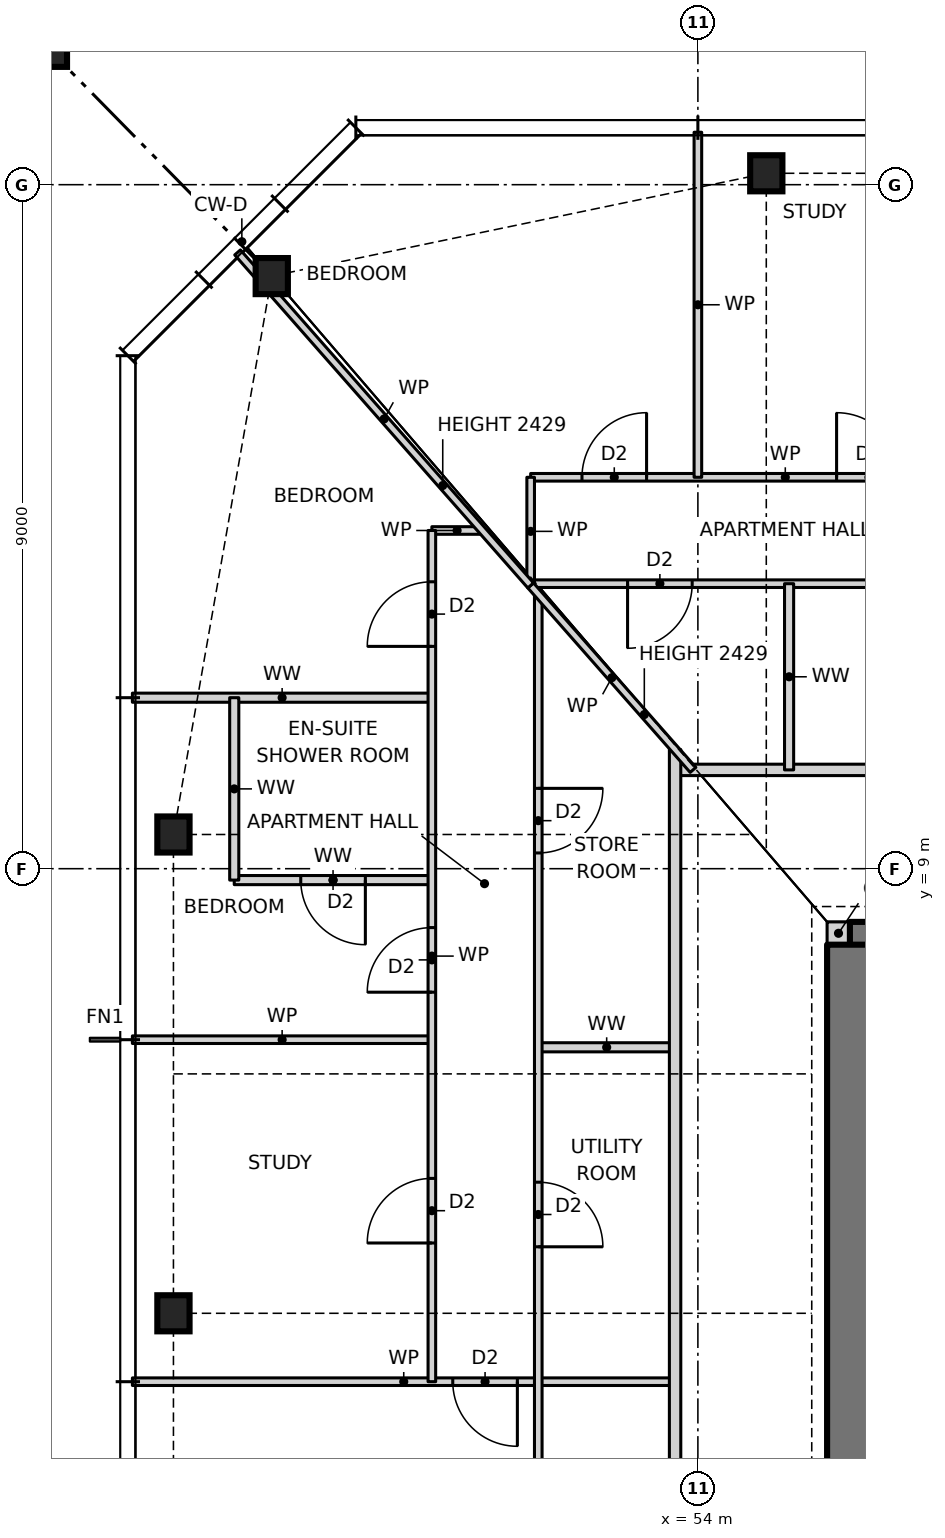
"""IFC4 building model, lengths in metres.
Left out: names, types, materials, properties, quantities, classifications, styles, units other than length and angle.
Written with IfcOpenShell. Run it as: python <this file> out.ifc"""

import sys

from ifc_helpers import new_model, si_unit, direction, frame, frame_2d, origin, origin_2d, place, context, subcontext, project, spatial, rectangle, hollow_rectangle, i_section, extrude, element, fill, save


model = new_model("IFC4")
c1 = context("Model", 3, precision=1e-05, world=origin(), true_north=direction((0.0, 1.0)))
c2 = subcontext(c1, "Body", "Model", "MODEL_VIEW")
j1 = project(units=[si_unit("LENGTHUNIT", "METRE"), si_unit("PLANEANGLEUNIT", "RADIAN")], contexts=[c1])
p1 = place(None, origin())
s1 = spatial("IfcSite", under=j1, at=p1, CompositionType="ELEMENT")
p2 = place(p1, origin())
s2 = spatial("IfcBuilding", under=s1, at=p2, CompositionType="ELEMENT")
p3 = place(p2, frame((0.0, 0.0, 15.0)))
s3 = spatial("IfcBuildingStorey", under=s2, at=p3, CompositionType="ELEMENT", Elevation=15.0)
for number, where, z_axis, x_axis in (
    (1, (54.9, 18.15, 0.0), (0.0, 0.0, 1.0), (1.0, 0.0, 0.0)),
    (2, (48.394, 16.797, 0.0), (0.0, 0.0, 1.0), (1.0, 0.0, 0.0)),
    (3, (47.1, 9.45, 0.0), (0.0, 0.0, 1.0), (1.0, 0.0, 0.0)),
    (4, (47.1, 3.15, 0.0), (0.0, 0.0, 1.0), (1.0, 0.0, 0.0)),
):
    element("IfcColumn", number, at=place(p3, frame(where, z_axis=z_axis, x_axis=x_axis)), inside=s3, PredefinedType="COLUMN", context=c2, shape_type="SweptSolid", body=[
        extrude(i_section(OverallWidth=0.424, OverallDepth=0.475, WebThickness=0.048, FlangeThickness=0.077, at=origin_2d()), origin(), (0.0, 0.0, 1.0), 3.5),
    ])
p4 = place(p3, frame((45.1, 20.15, 0.0), z_axis=(0.0, 0.0, 1.0), x_axis=(1.0, 0.0, 0.0)))
e5 = element("IfcColumn", 5, at=p4, inside=s3, PredefinedType="COLUMN", context=c2, shape_type="SweptSolid", body=[
    extrude(hollow_rectangle(XDim=1.2, YDim=1.2, WallThickness=0.07, at=origin_2d()), origin(), (0.0, 0.0, 1.0), 3.5),
])
p5 = place(p3, frame((55.7, 8.15, 0.0), z_axis=(0.0, 0.0, 1.0), x_axis=(1.0, 0.0, 0.0)))
e6 = element("IfcWall", 6, at=p5, inside=s3, PredefinedType="SOLIDWALL", context=c2, shape_type="SweptSolid", body=[
    extrude(rectangle(XDim=0.3, YDim=0.3, at=frame_2d((0.15, 0.0))), origin(), (0.0, 0.0, 1.0), 3.5),
])
p6 = place(p3, frame((70.0, 8.0, 0.0), z_axis=(0.0, 0.0, 1.0), x_axis=(-1.0, 0.0, 0.0)))
e7 = element("IfcWall", 7, at=p6, inside=s3, PredefinedType="SHEAR", context=c2, shape_type="SweptSolid", body=[
    extrude(rectangle(XDim=14.0, YDim=0.6, at=frame_2d((7.0, 0.0))), origin(), (0.0, 0.0, 1.0), 3.5),
])
p7 = place(p6, frame((8.2, 0.0, 0.0)))
e8 = element("IfcOpeningElement", 8, at=p7, cuts=e7, PredefinedType="OPENING", context=c2, shape_type="SweptSolid", body=[
    extrude(rectangle(XDim=0.9, YDim=2.1, at=frame_2d((0.45, 1.05))), frame((0.0, 0.31, 0.0), z_axis=(0.0, -1.0, 0.0), x_axis=(1.0, 0.0, 0.0)), (0.0, 0.0, 1.0), 0.62),
])
p8 = place(p6, frame((3.2, 0.0, 0.0)))
e9 = element("IfcOpeningElement", 9, at=p8, cuts=e7, PredefinedType="OPENING", context=c2, shape_type="SweptSolid", body=[
    extrude(rectangle(XDim=0.9, YDim=2.1, at=frame_2d((0.45, 1.05))), frame((0.0, 0.31, 0.0), z_axis=(0.0, -1.0, 0.0), x_axis=(1.0, 0.0, 0.0)), (0.0, 0.0, 1.0), 0.62),
])
p9 = place(p3, frame((56.0, 8.0, 0.0), z_axis=(0.0, 0.0, 1.0), x_axis=(0.0, -1.0, 0.0)))
e10 = element("IfcWall", 10, at=p9, inside=s3, PredefinedType="SHEAR", context=c2, shape_type="SweptSolid", body=[
    extrude(rectangle(XDim=16.0, YDim=0.6, at=frame_2d((8.0, 0.0))), origin(), (0.0, 0.0, 1.0), 3.5),
])
p10 = place(p9, frame((7.5, 0.0, 0.0)))
e11 = element("IfcOpeningElement", 11, at=p10, cuts=e10, PredefinedType="OPENING", context=c2, shape_type="SweptSolid", body=[
    extrude(rectangle(XDim=1.0, YDim=2.1, at=frame_2d((0.5, 1.05))), frame((0.0, 0.31, 0.0), z_axis=(0.0, -1.0, 0.0), x_axis=(1.0, 0.0, 0.0)), (0.0, 0.0, 1.0), 0.62),
])
p11 = place(p3, frame((46.56, 2.25, 0.0), z_axis=(0.0, 0.0, 1.0), x_axis=(1.0, 0.0, 0.0)))
e12 = element("IfcWall", 12, at=p11, inside=s3, PredefinedType="PARTITIONING", context=c2, shape_type="SweptSolid", body=[
    extrude(rectangle(XDim=7.14, YDim=0.1, at=frame_2d((3.57, 0.0))), origin(), (0.0, 0.0, 1.0), 3.27),
])
p12 = place(p11, frame((4.215, 0.0, 0.0)))
e13 = element("IfcOpeningElement", 13, at=p12, cuts=e12, PredefinedType="OPENING", context=c2, shape_type="SweptSolid", body=[
    extrude(rectangle(XDim=0.85, YDim=2.1, at=frame_2d((0.425, 1.05))), frame((0.0, 0.06, 0.0), z_axis=(0.0, -1.0, 0.0), x_axis=(1.0, 0.0, 0.0)), (0.0, 0.0, 1.0), 0.12),
])
p13 = place(p3, frame((51.9, 6.65, 0.0), z_axis=(0.0, 0.0, 1.0), x_axis=(1.0, 0.0, 0.0)))
e14 = element("IfcWall", 14, at=p13, inside=s3, PredefinedType="PARTITIONING", context=c2, shape_type="SweptSolid", body=[
    extrude(rectangle(XDim=1.8, YDim=0.12, at=frame_2d((0.9, 0.0))), origin(), (0.0, 0.0, 1.0), 3.27),
])
p14 = place(p3, frame((46.56, 6.75, 0.0), z_axis=(0.0, 0.0, 1.0), x_axis=(1.0, 0.0, 0.0)))
e15 = element("IfcWall", 15, at=p14, inside=s3, PredefinedType="PARTITIONING", context=c2, shape_type="SweptSolid", body=[
    extrude(rectangle(XDim=3.94, YDim=0.1, at=frame_2d((1.97, 0.0))), origin(), (0.0, 0.0, 1.0), 3.27),
])
p15 = place(p3, frame((47.9, 8.85, 0.0), z_axis=(0.0, 0.0, 1.0), x_axis=(1.0, 0.0, 0.0)))
e16 = element("IfcWall", 16, at=p15, inside=s3, PredefinedType="PARTITIONING", context=c2, shape_type="SweptSolid", body=[
    extrude(rectangle(XDim=2.6, YDim=0.12, at=frame_2d((1.3, 0.0))), origin(), (0.0, 0.0, 1.0), 3.27),
])
p16 = place(p15, frame((0.875, 0.0, 0.0)))
e17 = element("IfcOpeningElement", 17, at=p16, cuts=e16, PredefinedType="OPENING", context=c2, shape_type="SweptSolid", body=[
    extrude(rectangle(XDim=0.85, YDim=2.1, at=frame_2d((0.425, 1.05))), frame((0.0, 0.07, 0.0), z_axis=(0.0, -1.0, 0.0), x_axis=(1.0, 0.0, 0.0)), (0.0, 0.0, 1.0), 0.14),
])
p17 = place(p3, frame((53.7, 10.3, 0.0), z_axis=(0.0, 0.0, 1.0), x_axis=(1.0, 0.0, 0.0)))
e18 = element("IfcWall", 18, at=p17, inside=s3, PredefinedType="PARTITIONING", context=c2, shape_type="SweptSolid", body=[
    extrude(rectangle(XDim=18.6, YDim=0.15, at=frame_2d((9.3, 0.0))), origin(), (0.0, 0.0, 1.0), 3.27),
])
p18 = place(p17, frame((8.3, 0.0, 0.0)))
e19 = element("IfcOpeningElement", 19, at=p18, cuts=e18, PredefinedType="OPENING", context=c2, shape_type="SweptSolid", body=[
    extrude(rectangle(XDim=1.0, YDim=2.1, at=frame_2d((0.5, 1.05))), frame((0.0, 0.085, 0.0), z_axis=(0.0, -1.0, 0.0), x_axis=(1.0, 0.0, 0.0)), (0.0, 0.0, 1.0), 0.17),
])
p19 = place(p3, frame((46.56, 11.25, 0.0), z_axis=(0.0, 0.0, 1.0), x_axis=(1.0, 0.0, 0.0)))
e20 = element("IfcWall", 20, at=p19, inside=s3, PredefinedType="PARTITIONING", context=c2, shape_type="SweptSolid", body=[
    extrude(rectangle(XDim=3.94, YDim=0.12, at=frame_2d((1.97, 0.0))), origin(), (0.0, 0.0, 1.0), 3.27),
])
p20 = place(p3, frame((51.8, 12.75, 0.0), z_axis=(0.0, 0.0, 1.0), x_axis=(1.0, 0.0, 0.0)))
e21 = element("IfcWall", 21, at=p20, inside=s3, PredefinedType="PARTITIONING", context=c2, shape_type="SweptSolid", body=[
    extrude(rectangle(XDim=22.4, YDim=0.1, at=frame_2d((11.2, 0.0))), origin(), (0.0, 0.0, 1.0), 3.27),
])
p21 = place(p20, frame((13.475, 0.0, 0.0)))
e22 = element("IfcOpeningElement", 22, at=p21, cuts=e21, PredefinedType="OPENING", context=c2, shape_type="SweptSolid", body=[
    extrude(rectangle(XDim=0.85, YDim=2.1, at=frame_2d((0.425, 1.05))), frame((0.0, 0.06, 0.0), z_axis=(0.0, -1.0, 0.0), x_axis=(1.0, 0.0, 0.0)), (0.0, 0.0, 1.0), 0.12),
])
p22 = place(p20, frame((10.275, 0.0, 0.0)))
e23 = element("IfcOpeningElement", 23, at=p22, cuts=e21, PredefinedType="OPENING", context=c2, shape_type="SweptSolid", body=[
    extrude(rectangle(XDim=0.85, YDim=2.1, at=frame_2d((0.425, 1.05))), frame((0.0, 0.06, 0.0), z_axis=(0.0, -1.0, 0.0), x_axis=(1.0, 0.0, 0.0)), (0.0, 0.0, 1.0), 0.12),
])
p23 = place(p20, frame((16.925, 0.0, 0.0)))
e24 = element("IfcOpeningElement", 24, at=p23, cuts=e21, PredefinedType="OPENING", context=c2, shape_type="SweptSolid", body=[
    extrude(rectangle(XDim=0.85, YDim=2.1, at=frame_2d((0.425, 1.05))), frame((0.0, 0.06, 0.0), z_axis=(0.0, -1.0, 0.0), x_axis=(1.0, 0.0, 0.0)), (0.0, 0.0, 1.0), 0.12),
])
p24 = place(p20, frame((20.275, 0.0, 0.0)))
e25 = element("IfcOpeningElement", 25, at=p24, cuts=e21, PredefinedType="OPENING", context=c2, shape_type="SweptSolid", body=[
    extrude(rectangle(XDim=0.85, YDim=2.1, at=frame_2d((0.425, 1.05))), frame((0.0, 0.06, 0.0), z_axis=(0.0, -1.0, 0.0), x_axis=(1.0, 0.0, 0.0)), (0.0, 0.0, 1.0), 0.12),
])
p25 = place(p20, frame((4.625, 0.0, 0.0)))
e26 = element("IfcOpeningElement", 26, at=p25, cuts=e21, PredefinedType="OPENING", context=c2, shape_type="SweptSolid", body=[
    extrude(rectangle(XDim=0.85, YDim=2.1, at=frame_2d((0.425, 1.05))), frame((0.0, 0.06, 0.0), z_axis=(0.0, -1.0, 0.0), x_axis=(1.0, 0.0, 0.0)), (0.0, 0.0, 1.0), 0.12),
])
p26 = place(p20, frame((1.275, 0.0, 0.0)))
e27 = element("IfcOpeningElement", 27, at=p26, cuts=e21, PredefinedType="OPENING", context=c2, shape_type="SweptSolid", body=[
    extrude(rectangle(XDim=0.85, YDim=2.1, at=frame_2d((0.425, 1.05))), frame((0.0, 0.06, 0.0), z_axis=(0.0, -1.0, 0.0), x_axis=(1.0, 0.0, 0.0)), (0.0, 0.0, 1.0), 0.12),
])
p27 = place(p3, frame((50.5, 13.45, 0.0), z_axis=(0.0, 0.0, 1.0), x_axis=(1.0, 0.0, 0.0)))
e28 = element("IfcWall", 28, at=p27, inside=s3, PredefinedType="PARTITIONING", context=c2, shape_type="SweptSolid", body=[
    extrude(rectangle(XDim=0.664, YDim=0.1, at=frame_2d((0.332, 0.0))), origin(), (0.0, 0.0, 1.0), 3.27),
])
p28 = place(p3, frame((51.8, 14.15, 0.0), z_axis=(0.0, 0.0, 1.0), x_axis=(1.0, 0.0, 0.0)))
e29 = element("IfcWall", 29, at=p28, inside=s3, PredefinedType="PARTITIONING", context=c2, shape_type="SweptSolid", body=[
    extrude(rectangle(XDim=6.7, YDim=0.1, at=frame_2d((3.35, 0.0))), origin(), (0.0, 0.0, 1.0), 3.27),
])
p29 = place(p28, frame((4.025, 0.0, 0.0)))
e30 = element("IfcOpeningElement", 30, at=p29, cuts=e29, PredefinedType="OPENING", context=c2, shape_type="SweptSolid", body=[
    extrude(rectangle(XDim=0.85, YDim=2.1, at=frame_2d((0.425, 1.05))), frame((0.0, 0.06, 0.0), z_axis=(0.0, -1.0, 0.0), x_axis=(1.0, 0.0, 0.0)), (0.0, 0.0, 1.0), 0.12),
])
p30 = place(p28, frame((0.675, 0.0, 0.0)))
e31 = element("IfcOpeningElement", 31, at=p30, cuts=e29, PredefinedType="OPENING", context=c2, shape_type="SweptSolid", body=[
    extrude(rectangle(XDim=0.85, YDim=2.1, at=frame_2d((0.425, 1.05))), frame((0.0, 0.06, 0.0), z_axis=(0.0, -1.0, 0.0), x_axis=(1.0, 0.0, 0.0)), (0.0, 0.0, 1.0), 0.12),
])
p31 = place(p3, frame((55.2, 10.3, 0.0), z_axis=(0.0, 0.0, 1.0), x_axis=(0.0, 1.0, 0.0)))
e32 = element("IfcWall", 32, at=p31, inside=s3, PredefinedType="PARTITIONING", context=c2, shape_type="SweptSolid", body=[
    extrude(rectangle(XDim=2.45, YDim=0.12, at=frame_2d((1.225, 0.0))), origin(), (0.0, 0.0, 1.0), 3.27),
])
p32 = place(p3, frame((54.0, 14.15, 0.0), z_axis=(0.0, 0.0, 1.0), x_axis=(0.0, 1.0, 0.0)))
e33 = element("IfcWall", 33, at=p32, inside=s3, PredefinedType="PARTITIONING", context=c2, shape_type="SweptSolid", body=[
    extrude(rectangle(XDim=4.54, YDim=0.1, at=frame_2d((2.27, 0.0))), origin(), (0.0, 0.0, 1.0), 3.27),
])
p33 = place(p3, frame((53.7, -10.9, 0.0), z_axis=(0.0, 0.0, 1.0), x_axis=(0.0, 1.0, 0.0)))
e34 = element("IfcWall", 34, at=p33, inside=s3, PredefinedType="PARTITIONING", context=c2, shape_type="SweptSolid", body=[
    extrude(rectangle(XDim=21.468, YDim=0.15, at=frame_2d((10.734, 0.0))), origin(), (0.0, 0.0, 1.0), 3.27),
])
p34 = place(p33, frame((7.65, 0.0, 0.0)))
e35 = element("IfcOpeningElement", 35, at=p34, cuts=e34, PredefinedType="OPENING", context=c2, shape_type="SweptSolid", body=[
    extrude(rectangle(XDim=1.0, YDim=2.1, at=frame_2d((0.5, 1.05))), frame((0.0, 0.085, 0.0), z_axis=(0.0, -1.0, 0.0), x_axis=(1.0, 0.0, 0.0)), (0.0, 0.0, 1.0), 0.17),
])
p35 = place(p3, frame((51.9, -12.614, 0.0), z_axis=(0.0, 0.0, 1.0), x_axis=(0.0, 1.0, 0.0)))
e36 = element("IfcWall", 36, at=p35, inside=s3, PredefinedType="PARTITIONING", context=c2, shape_type="SweptSolid", body=[
    extrude(rectangle(XDim=25.228, YDim=0.1, at=frame_2d((12.614, 0.0))), origin(), (0.0, 0.0, 1.0), 3.27),
])
p36 = place(p35, frame((12.639, 0.0, 0.0)))
e37 = element("IfcOpeningElement", 37, at=p36, cuts=e36, PredefinedType="OPENING", context=c2, shape_type="SweptSolid", body=[
    extrude(rectangle(XDim=0.85, YDim=2.1, at=frame_2d((0.425, 1.05))), frame((0.0, 0.06, 0.0), z_axis=(0.0, -1.0, 0.0), x_axis=(1.0, 0.0, 0.0)), (0.0, 0.0, 1.0), 0.12),
])
p37 = place(p35, frame((9.439, 0.0, 0.0)))
e38 = element("IfcOpeningElement", 38, at=p37, cuts=e36, PredefinedType="OPENING", context=c2, shape_type="SweptSolid", body=[
    extrude(rectangle(XDim=0.85, YDim=2.1, at=frame_2d((0.425, 1.05))), frame((0.0, 0.06, 0.0), z_axis=(0.0, -1.0, 0.0), x_axis=(1.0, 0.0, 0.0)), (0.0, 0.0, 1.0), 0.12),
])
p38 = place(p35, frame((16.639, 0.0, 0.0)))
e39 = element("IfcOpeningElement", 39, at=p38, cuts=e36, PredefinedType="OPENING", context=c2, shape_type="SweptSolid", body=[
    extrude(rectangle(XDim=0.85, YDim=2.1, at=frame_2d((0.425, 1.05))), frame((0.0, 0.06, 0.0), z_axis=(0.0, -1.0, 0.0), x_axis=(1.0, 0.0, 0.0)), (0.0, 0.0, 1.0), 0.12),
])
p39 = place(p35, frame((21.821, 0.0, 0.0)))
e40 = element("IfcOpeningElement", 40, at=p39, cuts=e36, PredefinedType="OPENING", context=c2, shape_type="SweptSolid", body=[
    extrude(rectangle(XDim=0.85, YDim=2.1, at=frame_2d((0.425, 1.05))), frame((0.0, 0.06, 0.0), z_axis=(0.0, -1.0, 0.0), x_axis=(1.0, 0.0, 0.0)), (0.0, 0.0, 1.0), 0.12),
])
p40 = place(p35, frame((2.507, 0.0, 0.0)))
e41 = element("IfcOpeningElement", 41, at=p40, cuts=e36, PredefinedType="OPENING", context=c2, shape_type="SweptSolid", body=[
    extrude(rectangle(XDim=0.85, YDim=2.1, at=frame_2d((0.425, 1.05))), frame((0.0, 0.06, 0.0), z_axis=(0.0, -1.0, 0.0), x_axis=(1.0, 0.0, 0.0)), (0.0, 0.0, 1.0), 0.12),
])
p41 = place(p3, frame((51.8, 12.727, 0.0), z_axis=(0.0, 0.0, 1.0), x_axis=(0.0, 1.0, 0.0)))
e42 = element("IfcWall", 42, at=p41, inside=s3, PredefinedType="PARTITIONING", context=c2, shape_type="SweptSolid", body=[
    extrude(rectangle(XDim=1.423, YDim=0.1, at=frame_2d((0.711, 0.0))), origin(), (0.0, 0.0, 1.0), 3.27),
])
p42 = place(p3, frame((50.5, 2.25, 0.0), z_axis=(0.0, 0.0, 1.0), x_axis=(0.0, 1.0, 0.0)))
e43 = element("IfcWall", 43, at=p42, inside=s3, PredefinedType="PARTITIONING", context=c2, shape_type="SweptSolid", body=[
    extrude(rectangle(XDim=11.2, YDim=0.1, at=frame_2d((5.6, 0.0))), origin(), (0.0, 0.0, 1.0), 3.27),
])
p43 = place(p42, frame((1.825, 0.0, 0.0)))
e44 = element("IfcOpeningElement", 44, at=p43, cuts=e43, PredefinedType="OPENING", context=c2, shape_type="SweptSolid", body=[
    extrude(rectangle(XDim=0.85, YDim=2.1, at=frame_2d((0.425, 1.05))), frame((0.0, 0.06, 0.0), z_axis=(0.0, -1.0, 0.0), x_axis=(1.0, 0.0, 0.0)), (0.0, 0.0, 1.0), 0.12),
])
p44 = place(p42, frame((5.125, 0.0, 0.0)))
e45 = element("IfcOpeningElement", 45, at=p44, cuts=e43, PredefinedType="OPENING", context=c2, shape_type="SweptSolid", body=[
    extrude(rectangle(XDim=0.85, YDim=2.1, at=frame_2d((0.425, 1.05))), frame((0.0, 0.06, 0.0), z_axis=(0.0, -1.0, 0.0), x_axis=(1.0, 0.0, 0.0)), (0.0, 0.0, 1.0), 0.12),
])
p45 = place(p42, frame((9.675, 0.0, 0.0)))
e46 = element("IfcOpeningElement", 46, at=p45, cuts=e43, PredefinedType="OPENING", context=c2, shape_type="SweptSolid", body=[
    extrude(rectangle(XDim=0.85, YDim=2.1, at=frame_2d((0.425, 1.05))), frame((0.0, 0.06, 0.0), z_axis=(0.0, -1.0, 0.0), x_axis=(1.0, 0.0, 0.0)), (0.0, 0.0, 1.0), 0.12),
])
p46 = place(p3, frame((47.9, 8.85, 0.0), z_axis=(0.0, 0.0, 1.0), x_axis=(0.0, 1.0, 0.0)))
e47 = element("IfcWall", 47, at=p46, inside=s3, PredefinedType="PARTITIONING", context=c2, shape_type="SweptSolid", body=[
    extrude(rectangle(XDim=2.4, YDim=0.12, at=frame_2d((1.2, 0.0))), origin(), (0.0, 0.0, 1.0), 3.27),
])
p47 = place(p3, frame((53.936, 10.3, 0.0), z_axis=(0.0, 0.0, 1.0), x_axis=(-0.660667046586, 0.75067906162, 0.0)))
e48 = element("IfcWall", 48, at=p47, inside=s3, PredefinedType="PARTITIONING", context=c2, shape_type="SweptSolid", body=[
    extrude(rectangle(XDim=3.233, YDim=0.1, at=frame_2d((1.617, 0.0))), origin(), (0.0, 0.0, 1.0), 2.429),
])
p48 = place(p3, frame((51.8, 12.727, 0.0), z_axis=(0.0, 0.0, 1.0), x_axis=(-0.660690123093, 0.750658751529, 0.0)))
e49 = element("IfcWall", 49, at=p48, inside=s3, PredefinedType="PARTITIONING", context=c2, shape_type="SweptSolid", body=[
    extrude(rectangle(XDim=5.837, YDim=0.1, at=frame_2d((2.918, 0.0))), origin(), (0.0, 0.0, 1.0), 2.429),
])
p49 = place(p29, origin())
e50 = element("IfcDoor", 50, at=p49, inside=s3, OperationType="SINGLE_SWING_LEFT", PredefinedType="DOOR", context=c2, shape_type="SweptSolid", body=[
    extrude(rectangle(XDim=0.85, YDim=2.1, at=frame_2d((0.425, 1.05))), frame((0.0, 0.025, 0.0), z_axis=(0.0, -1.0, 0.0), x_axis=(1.0, 0.0, 0.0)), (0.0, 0.0, 1.0), 0.05),
])
fill(e30, e50)
p50 = place(p30, origin())
e51 = element("IfcDoor", 51, at=p50, inside=s3, OperationType="SINGLE_SWING_RIGHT", PredefinedType="DOOR", context=c2, shape_type="SweptSolid", body=[
    extrude(rectangle(XDim=0.85, YDim=2.1, at=frame_2d((0.425, 1.05))), frame((0.0, 0.025, 0.0), z_axis=(0.0, -1.0, 0.0), x_axis=(1.0, 0.0, 0.0)), (0.0, 0.0, 1.0), 0.05),
])
fill(e31, e51)
p51 = place(p26, frame((0.85, 0.0, 0.0), z_axis=(0.0, 0.0, 1.0), x_axis=(-1.0, 0.0, 0.0)))
e52 = element("IfcDoor", 52, at=p51, inside=s3, OperationType="SINGLE_SWING_RIGHT", PredefinedType="DOOR", context=c2, shape_type="SweptSolid", body=[
    extrude(rectangle(XDim=0.85, YDim=2.1, at=frame_2d((0.425, 1.05))), frame((0.0, 0.025, 0.0), z_axis=(0.0, -1.0, 0.0), x_axis=(1.0, 0.0, 0.0)), (0.0, 0.0, 1.0), 0.05),
])
fill(e27, e52)
p52 = place(p12, frame((0.85, 0.0, 0.0), z_axis=(0.0, 0.0, 1.0), x_axis=(-1.0, 0.0, 0.0)))
e53 = element("IfcDoor", 53, at=p52, inside=s3, OperationType="SINGLE_SWING_LEFT", PredefinedType="DOOR", context=c2, shape_type="SweptSolid", body=[
    extrude(rectangle(XDim=0.85, YDim=2.1, at=frame_2d((0.425, 1.05))), frame((0.0, 0.025, 0.0), z_axis=(0.0, -1.0, 0.0), x_axis=(1.0, 0.0, 0.0)), (0.0, 0.0, 1.0), 0.05),
])
fill(e13, e53)
p53 = place(p43, origin())
e54 = element("IfcDoor", 54, at=p53, inside=s3, OperationType="SINGLE_SWING_LEFT", PredefinedType="DOOR", context=c2, shape_type="SweptSolid", body=[
    extrude(rectangle(XDim=0.85, YDim=2.1, at=frame_2d((0.425, 1.05))), frame((0.0, 0.025, 0.0), z_axis=(0.0, -1.0, 0.0), x_axis=(1.0, 0.0, 0.0)), (0.0, 0.0, 1.0), 0.05),
])
fill(e44, e54)
p54 = place(p16, frame((0.85, 0.0, 0.0), z_axis=(0.0, 0.0, 1.0), x_axis=(-1.0, 0.0, 0.0)))
e55 = element("IfcDoor", 55, at=p54, inside=s3, OperationType="SINGLE_SWING_LEFT", PredefinedType="DOOR", context=c2, shape_type="SweptSolid", body=[
    extrude(rectangle(XDim=0.85, YDim=2.1, at=frame_2d((0.425, 1.05))), frame((0.0, 0.025, 0.0), z_axis=(0.0, -1.0, 0.0), x_axis=(1.0, 0.0, 0.0)), (0.0, 0.0, 1.0), 0.05),
])
fill(e17, e55)
p55 = place(p44, origin())
e56 = element("IfcDoor", 56, at=p55, inside=s3, OperationType="SINGLE_SWING_LEFT", PredefinedType="DOOR", context=c2, shape_type="SweptSolid", body=[
    extrude(rectangle(XDim=0.85, YDim=2.1, at=frame_2d((0.425, 1.05))), frame((0.0, 0.025, 0.0), z_axis=(0.0, -1.0, 0.0), x_axis=(1.0, 0.0, 0.0)), (0.0, 0.0, 1.0), 0.05),
])
fill(e45, e56)
p56 = place(p45, origin())
e57 = element("IfcDoor", 57, at=p56, inside=s3, OperationType="SINGLE_SWING_LEFT", PredefinedType="DOOR", context=c2, shape_type="SweptSolid", body=[
    extrude(rectangle(XDim=0.85, YDim=2.1, at=frame_2d((0.425, 1.05))), frame((0.0, 0.025, 0.0), z_axis=(0.0, -1.0, 0.0), x_axis=(1.0, 0.0, 0.0)), (0.0, 0.0, 1.0), 0.05),
])
fill(e46, e57)
p57 = place(p38, frame((0.85, 0.0, 0.0), z_axis=(0.0, 0.0, 1.0), x_axis=(-1.0, 0.0, 0.0)))
e58 = element("IfcDoor", 58, at=p57, inside=s3, OperationType="SINGLE_SWING_RIGHT", PredefinedType="DOOR", context=c2, shape_type="SweptSolid", body=[
    extrude(rectangle(XDim=0.85, YDim=2.1, at=frame_2d((0.425, 1.05))), frame((0.0, 0.025, 0.0), z_axis=(0.0, -1.0, 0.0), x_axis=(1.0, 0.0, 0.0)), (0.0, 0.0, 1.0), 0.05),
])
fill(e39, e58)
p58 = place(p39, frame((0.85, 0.0, 0.0), z_axis=(0.0, 0.0, 1.0), x_axis=(-1.0, 0.0, 0.0)))
e59 = element("IfcDoor", 59, at=p58, inside=s3, OperationType="SINGLE_SWING_LEFT", PredefinedType="DOOR", context=c2, shape_type="SweptSolid", body=[
    extrude(rectangle(XDim=0.85, YDim=2.1, at=frame_2d((0.425, 1.05))), frame((0.0, 0.025, 0.0), z_axis=(0.0, -1.0, 0.0), x_axis=(1.0, 0.0, 0.0)), (0.0, 0.0, 1.0), 0.05),
])
fill(e40, e59)
save(model, sys.argv[1])
